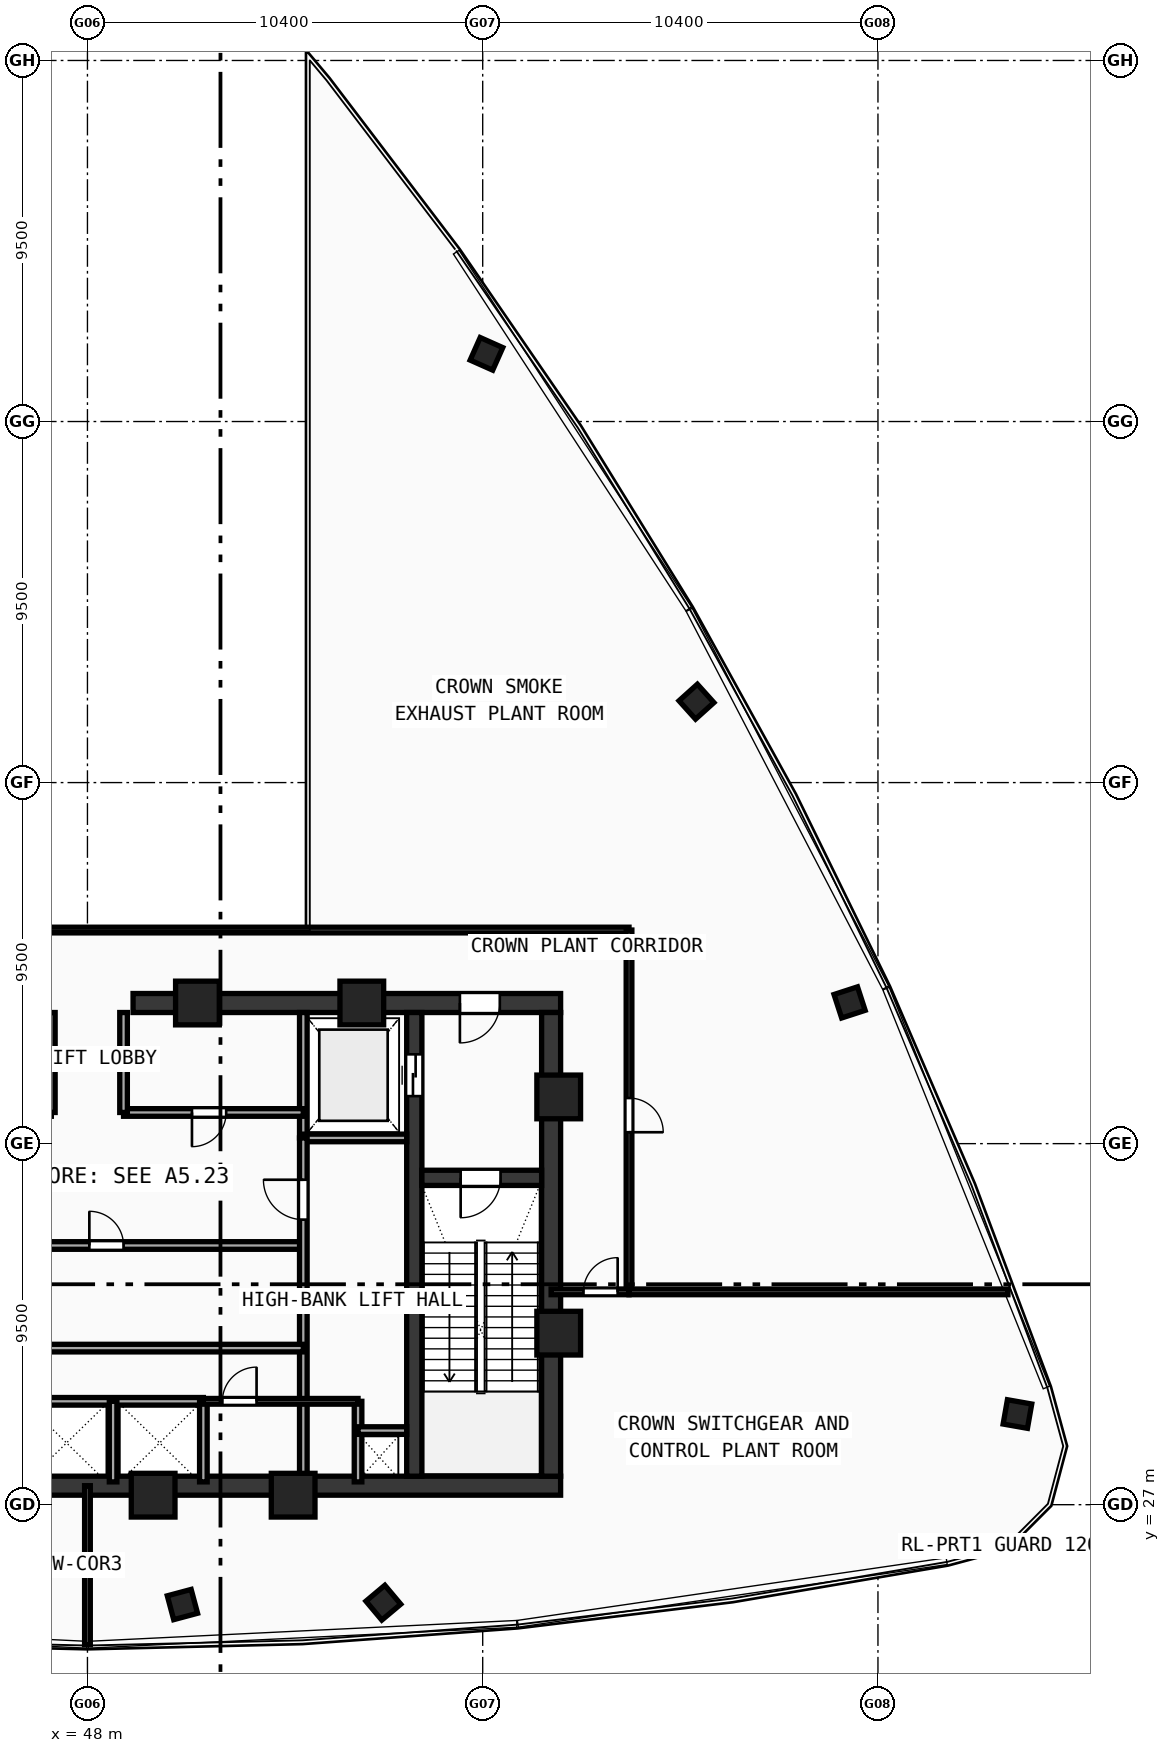
"""IFC4 building model, lengths in metres.
Left out: names, types, materials, properties, quantities, classifications, styles, units other than length and angle.
Written with IfcOpenShell. Run it as: python <this file> out.ifc"""

import sys

from ifc_helpers import new_model, si_unit, direction, frame, frame_2d, origin, origin_with_axes, origin_2d, place, context, subcontext, project, spatial, rectangle, hollow_rectangle, extrude, source, transform, mapped, element, fill, save


model = new_model("IFC4")
c1 = context("Model", 3, precision=1e-05, world=origin(), true_north=direction((0.0, 1.0)))
c2 = subcontext(c1, "Body", "Model", "MODEL_VIEW")
j1 = project(units=[si_unit("LENGTHUNIT", "METRE"), si_unit("PLANEANGLEUNIT", "RADIAN")], contexts=[c1])
p1 = place(None, origin())
s1 = spatial("IfcSite", under=j1, at=p1, CompositionType="ELEMENT")
p2 = place(p1, origin())
s2 = spatial("IfcBuilding", under=s1, at=p2, CompositionType="ELEMENT")
p3 = place(p2, frame((0.0, 0.0, 371.76)))
s3 = spatial("IfcBuildingStorey", under=s2, at=p3, CompositionType="ELEMENT", Elevation=371.76)
p4 = place(p3, frame((35.55, 27.5, 0.0), z_axis=(0.0, 0.0, 1.0), x_axis=(1.0, 0.0, 0.0)))
e1 = element("IfcWall", 1, at=p4, inside=s3, PredefinedType="SHEAR", context=c2, shape_type="SweptSolid", body=[
    extrude(rectangle(XDim=24.9, YDim=0.5, at=frame_2d((12.45, 0.0))), origin(), (0.0, 0.0, 1.0), 4.72),
])
p5 = place(p3, frame((49.2, 40.2, 0.0), z_axis=(0.0, 0.0, 1.0), x_axis=(1.0, 0.0, 0.0)))
e2 = element("IfcWall", 2, at=p5, inside=s3, PredefinedType="SHEAR", context=c2, shape_type="SweptSolid", body=[
    extrude(rectangle(XDim=11.25, YDim=0.5, at=frame_2d((5.625, 0.0))), origin(), (0.0, 0.0, 1.0), 4.72),
])
p6 = place(p5, frame((8.6, 0.0, 0.0)))
e3 = element("IfcOpeningElement", 3, at=p6, cuts=e2, PredefinedType="OPENING", context=c2, shape_type="SweptSolid", body=[
    extrude(rectangle(XDim=1.05, YDim=2.1, at=frame_2d((0.525, 1.05))), frame((0.0, 0.26, 0.0), z_axis=(0.0, -1.0, 0.0), x_axis=(1.0, 0.0, 0.0)), (0.0, 0.0, 1.0), 0.52),
])
p7 = place(p3, frame((60.2, 27.75, 0.0), z_axis=(0.0, 0.0, 1.0), x_axis=(0.0, 1.0, 0.0)))
e4 = element("IfcWall", 4, at=p7, inside=s3, PredefinedType="SHEAR", context=c2, shape_type="SweptSolid", body=[
    extrude(rectangle(XDim=12.2, YDim=0.5, at=frame_2d((6.1, 0.0))), origin(), (0.0, 0.0, 1.0), 4.72),
])
p8 = place(p3, frame((56.6, 27.75, 0.0), z_axis=(0.0, 0.0, 1.0), x_axis=(0.0, 1.0, 0.0)))
e5 = element("IfcWall", 5, at=p8, inside=s3, PredefinedType="SHEAR", context=c2, shape_type="SweptSolid", body=[
    extrude(rectangle(XDim=12.2, YDim=0.4, at=frame_2d((6.1, 0.0))), origin(), (0.0, 0.0, 1.0), 4.72),
])
p9 = place(p8, frame((10.0, 0.0, 0.0)))
e6 = element("IfcOpeningElement", 6, at=p9, cuts=e5, PredefinedType="OPENING", context=c2, shape_type="SweptSolid", body=[
    extrude(rectangle(XDim=1.1, YDim=2.1, at=frame_2d((0.55, 1.05))), frame((0.0, 0.21, 0.0), z_axis=(0.0, -1.0, 0.0), x_axis=(1.0, 0.0, 0.0)), (0.0, 0.0, 1.0), 0.42),
])
p10 = place(p3, frame((56.8, 35.6, 0.0), z_axis=(0.0, 0.0, 1.0), x_axis=(1.0, 0.0, 0.0)))
e7 = element("IfcWall", 7, at=p10, inside=s3, PredefinedType="SHEAR", context=c2, shape_type="SweptSolid", body=[
    extrude(rectangle(XDim=3.15, YDim=0.4, at=frame_2d((1.575, 0.0))), origin(), (0.0, 0.0, 1.0), 4.72),
])
p11 = place(p10, frame((1.02, 0.0, 0.0)))
e8 = element("IfcOpeningElement", 8, at=p11, cuts=e7, PredefinedType="OPENING", context=c2, shape_type="SweptSolid", body=[
    extrude(rectangle(XDim=1.05, YDim=2.1, at=frame_2d((0.525, 1.05))), frame((0.0, 0.21, 0.0), z_axis=(0.0, -1.0, 0.0), x_axis=(1.0, 0.0, 0.0)), (0.0, 0.0, 1.0), 0.42),
])
m1 = source(origin(), c2, "Body", "SweptSolid", [
    extrude(hollow_rectangle(XDim=1.15, YDim=1.15, WallThickness=0.048, at=origin_2d()), origin(), (0.0, 0.0, 1.0), 5.0),
])
for number, where, z_axis, x_axis in (
    (9, (49.729, 27.25, -0.28), (0.0, 0.0, 1.0), (1.0, 0.0, 0.0)),
    (10, (53.412, 27.25, -0.28), (0.0, 0.0, 1.0), (1.0, 0.0, 0.0)),
    (11, (60.4, 31.513, -0.28), (0.0, 0.0, 1.0), (1.0, 0.0, 0.0)),
    (12, (60.4, 37.729, -0.28), (0.0, 0.0, 1.0), (1.0, 0.0, 0.0)),
    (13, (55.219, 40.2, -0.28), (0.0, 0.0, 1.0), (1.0, 0.0, 0.0)),
    (14, (50.894, 40.2, -0.28), (0.0, 0.0, 1.0), (1.0, 0.0, 0.0)),
):
    element("IfcColumn", number, at=place(p3, frame(where, z_axis=z_axis, x_axis=x_axis)), inside=s3, PredefinedType="COLUMN", context=c2, shape_type="MappedRepresentation", body=[
        mapped(m1, transform((0.0, 0.0, 0.0), scale=1.0)),
    ])
m2 = source(origin(), c2, "Body", "SweptSolid", [
    extrude(hollow_rectangle(XDim=0.65, YDim=0.65, WallThickness=0.024, at=origin_2d()), origin(), (0.0, 0.0, 1.0), 5.0),
])
for number, where, z_axis, x_axis in (
    (15, (50.499, 24.373, -0.28), (0.0, 0.0, 1.0), (0.966, 0.259, 0.0)),
    (16, (55.785, 24.422, -0.28), (0.0, 0.0, 1.0), (0.766, 0.643, 0.0)),
    (17, (72.47, 29.385, -0.28), (0.0, 0.0, 1.0), (0.174, 0.985, 0.0)),
    (18, (68.053, 40.216, -0.28), (0.0, 0.0, 1.0), (-0.309, 0.951, 0.0)),
    (19, (64.025, 48.129, -0.28), (0.0, 0.0, 1.0), (-0.669, 0.743, 0.0)),
    (20, (58.499, 57.281, -0.28), (0.0, 0.0, 1.0), (-0.914, 0.407, 0.0)),
):
    element("IfcColumn", number, at=place(p3, frame(where, z_axis=z_axis, x_axis=x_axis)), inside=s3, PredefinedType="COLUMN", context=c2, shape_type="MappedRepresentation", body=[
        mapped(m2, transform((0.0, 0.0, 0.0), scale=1.0)),
    ])
p12 = place(p3, frame((53.68, 36.65, 0.0), z_axis=(0.0, 0.0, 1.0), x_axis=(0.0, 1.0, 0.0)))
e21 = element("IfcWall", 21, at=p12, inside=s3, PredefinedType="SOLIDWALL", context=c2, shape_type="SweptSolid", body=[
    extrude(rectangle(XDim=3.3, YDim=0.2, at=frame_2d((1.65, 0.0))), origin(), (0.0, 0.0, 1.0), 4.72),
])
p13 = place(p3, frame((53.68, 36.65, 0.0), z_axis=(0.0, 0.0, 1.0), x_axis=(1.0, 0.0, 0.0)))
e22 = element("IfcWall", 22, at=p13, inside=s3, PredefinedType="SOLIDWALL", context=c2, shape_type="SweptSolid", body=[
    extrude(rectangle(XDim=2.72, YDim=0.2, at=frame_2d((1.36, 0.0))), origin(), (0.0, 0.0, 1.0), 4.72),
])
p14 = place(p3, frame((48.95, 37.32, 0.0), z_axis=(0.0, 0.0, 1.0), x_axis=(1.0, 0.0, 0.0)))
e23 = element("IfcWall", 23, at=p14, inside=s3, PredefinedType="SOLIDWALL", context=c2, shape_type="SweptSolid", body=[
    extrude(rectangle(XDim=4.73, YDim=0.2, at=frame_2d((2.365, 0.0))), origin(), (0.0, 0.0, 1.0), 4.72),
])
p15 = place(p14, frame((1.8, 0.0, 0.0)))
e24 = element("IfcOpeningElement", 24, at=p15, cuts=e23, PredefinedType="OPENING", context=c2, shape_type="SweptSolid", body=[
    extrude(rectangle(XDim=0.9, YDim=2.1, at=frame_2d((0.45, 1.05))), frame((0.0, 0.11, 0.0), z_axis=(0.0, -1.0, 0.0), x_axis=(1.0, 0.0, 0.0)), (0.0, 0.0, 1.0), 0.22),
])
for number, where, z_axis, x_axis in (
    (25, (47.05, 37.32, 0.0), (0.0, 0.0, 1.0), (0.0, 1.0, 0.0)),
    (26, (48.95, 37.32, 0.0), (0.0, 0.0, 1.0), (0.0, 1.0, 0.0)),
):
    element("IfcWall", number, at=place(p3, frame(where, z_axis=z_axis, x_axis=x_axis)), inside=s3, PredefinedType="SOLIDWALL", context=c2, shape_type="SweptSolid", body=[
        extrude(rectangle(XDim=2.63, YDim=0.2, at=frame_2d((1.315, 0.0))), origin(), (0.0, 0.0, 1.0), 4.72),
    ])
p16 = place(p3, frame((43.85, 33.82, 0.0), z_axis=(0.0, 0.0, 1.0), x_axis=(1.0, 0.0, 0.0)))
e27 = element("IfcWall", 27, at=p16, inside=s3, PredefinedType="SOLIDWALL", context=c2, shape_type="SweptSolid", body=[
    extrude(rectangle(XDim=9.83, YDim=0.2, at=frame_2d((4.915, 0.0))), origin(), (0.0, 0.0, 1.0), 4.72),
])
p17 = place(p16, frame((4.2, 0.0, 0.0)))
e28 = element("IfcOpeningElement", 28, at=p17, cuts=e27, PredefinedType="OPENING", context=c2, shape_type="SweptSolid", body=[
    extrude(rectangle(XDim=0.9, YDim=2.1, at=frame_2d((0.45, 1.05))), frame((0.0, 0.11, 0.0), z_axis=(0.0, -1.0, 0.0), x_axis=(1.0, 0.0, 0.0)), (0.0, 0.0, 1.0), 0.22),
])
p18 = place(p3, frame((53.68, 27.6, 0.0), z_axis=(0.0, 0.0, 1.0), x_axis=(0.0, 1.0, 0.0)))
e29 = element("IfcWall", 29, at=p18, inside=s3, PredefinedType="SOLIDWALL", context=c2, shape_type="SweptSolid", body=[
    extrude(rectangle(XDim=9.05, YDim=0.2, at=frame_2d((4.525, 0.0))), origin(), (0.0, 0.0, 1.0), 4.72),
])
p19 = place(p18, frame((6.9, 0.0, 0.0)))
e30 = element("IfcOpeningElement", 30, at=p19, cuts=e29, PredefinedType="OPENING", context=c2, shape_type="SweptSolid", body=[
    extrude(rectangle(XDim=1.05, YDim=2.1, at=frame_2d((0.525, 1.05))), frame((0.0, 0.11, 0.0), z_axis=(0.0, -1.0, 0.0), x_axis=(1.0, 0.0, 0.0)), (0.0, 0.0, 1.0), 0.22),
])
p20 = place(p3, frame((43.85, 29.72, 0.0), z_axis=(0.0, 0.0, 1.0), x_axis=(1.0, 0.0, 0.0)))
e31 = element("IfcWall", 31, at=p20, inside=s3, PredefinedType="SOLIDWALL", context=c2, shape_type="SweptSolid", body=[
    extrude(rectangle(XDim=7.2, YDim=0.2, at=frame_2d((3.6, 0.0))), origin(), (0.0, 0.0, 1.0), 4.72),
])
p21 = place(p3, frame((51.05, 27.6, 0.0), z_axis=(0.0, 0.0, 1.0), x_axis=(0.0, 1.0, 0.0)))
e32 = element("IfcWall", 32, at=p21, inside=s3, PredefinedType="SOLIDWALL", context=c2, shape_type="SweptSolid", body=[
    extrude(rectangle(XDim=2.12, YDim=0.2, at=frame_2d((1.06, 0.0))), origin(), (0.0, 0.0, 1.0), 4.72),
])
p22 = place(p3, frame((43.85, 31.12, 0.0), z_axis=(0.0, 0.0, 1.0), x_axis=(1.0, 0.0, 0.0)))
e33 = element("IfcWall", 33, at=p22, inside=s3, PredefinedType="SOLIDWALL", context=c2, shape_type="SweptSolid", body=[
    extrude(rectangle(XDim=9.83, YDim=0.2, at=frame_2d((4.915, 0.0))), origin(), (0.0, 0.0, 1.0), 4.72),
])
for number, where, z_axis, x_axis in (
    (34, (48.675, 27.6, 0.0), (0.0, 0.0, 1.0), (0.0, 1.0, 0.0)),
    (35, (55.12, 27.6, 0.0), (0.0, 0.0, 1.0), (0.0, 1.0, 0.0)),
):
    element("IfcWall", number, at=place(p3, frame(where, z_axis=z_axis, x_axis=x_axis)), inside=s3, PredefinedType="SOLIDWALL", context=c2, shape_type="SweptSolid", body=[
        extrude(rectangle(XDim=2.12, YDim=0.2, at=frame_2d((1.06, 0.0))), origin(), (0.0, 0.0, 1.0), 4.72),
    ])
p23 = place(p3, frame((55.12, 28.95, 0.0), z_axis=(0.0, 0.0, 1.0), x_axis=(1.0, 0.0, 0.0)))
e36 = element("IfcWall", 36, at=p23, inside=s3, PredefinedType="SOLIDWALL", context=c2, shape_type="SweptSolid", body=[
    extrude(rectangle(XDim=1.28, YDim=0.2, at=frame_2d((0.64, 0.0))), origin(), (0.0, 0.0, 1.0), 4.72),
])
p24 = place(p3, frame((51.05, 29.72, 0.0), z_axis=(0.0, 0.0, 1.0), x_axis=(1.0, 0.0, 0.0)))
e37 = element("IfcWall", 37, at=p24, inside=s3, PredefinedType="PARTITIONING", context=c2, shape_type="SweptSolid", body=[
    extrude(rectangle(XDim=4.07, YDim=0.15, at=frame_2d((2.035, 0.0))), origin(), (0.0, 0.0, 1.0), 4.72),
])
p25 = place(p24, frame((0.5, 0.0, 0.0)))
e38 = element("IfcOpeningElement", 38, at=p25, cuts=e37, PredefinedType="OPENING", context=c2, shape_type="SweptSolid", body=[
    extrude(rectangle(XDim=0.9, YDim=2.1, at=frame_2d((0.45, 1.05))), frame((0.0, 0.085, 0.0), z_axis=(0.0, -1.0, 0.0), x_axis=(1.0, 0.0, 0.0)), (0.0, 0.0, 1.0), 0.17),
])
p26 = place(p3, frame((48.0, 23.314, 0.0), z_axis=(0.0, 0.0, 1.0), x_axis=(0.0, 1.0, 0.0)))
e39 = element("IfcWall", 39, at=p26, inside=s3, PredefinedType="PARTITIONING", context=c2, shape_type="SweptSolid", body=[
    extrude(rectangle(XDim=4.186, YDim=0.15, at=frame_2d((2.093, 0.0))), origin(), (0.0, 0.0, 1.0), 4.12),
])
p27 = place(p3, frame((35.6, 42.12, 0.0), z_axis=(0.0, 0.0, 1.0), x_axis=(1.0, 0.0, 0.0)))
e40 = element("IfcWall", 40, at=p27, inside=s3, PredefinedType="PARTITIONING", context=c2, shape_type="SweptSolid", body=[
    extrude(rectangle(XDim=26.65, YDim=0.15, at=frame_2d((13.325, 0.0))), origin(), (0.0, 0.0, 1.0), 4.12),
])
p28 = place(p3, frame((62.25, 32.6, 0.0), z_axis=(0.0, 0.0, 1.0), x_axis=(0.0, 1.0, 0.0)))
e41 = element("IfcWall", 41, at=p28, inside=s3, PredefinedType="PARTITIONING", context=c2, shape_type="SweptSolid", body=[
    extrude(rectangle(XDim=9.52, YDim=0.15, at=frame_2d((4.76, 0.0))), origin(), (0.0, 0.0, 1.0), 4.12),
])
p29 = place(p28, frame((4.2, 0.0, 0.0)))
e42 = element("IfcOpeningElement", 42, at=p29, cuts=e41, PredefinedType="OPENING", context=c2, shape_type="SweptSolid", body=[
    extrude(rectangle(XDim=0.9, YDim=2.1, at=frame_2d((0.45, 1.05))), frame((0.0, 0.085, 0.0), z_axis=(0.0, -1.0, 0.0), x_axis=(1.0, 0.0, 0.0)), (0.0, 0.0, 1.0), 0.17),
])
p30 = place(p3, frame((60.2, 32.6, 0.0), z_axis=(0.0, 0.0, 1.0), x_axis=(1.0, 0.0, 0.0)))
e43 = element("IfcWall", 43, at=p30, inside=s3, PredefinedType="PARTITIONING", context=c2, shape_type="SweptSolid", body=[
    extrude(rectangle(XDim=2.05, YDim=0.15, at=frame_2d((1.025, 0.0))), origin(), (0.0, 0.0, 1.0), 4.72),
])
p31 = place(p30, frame((0.851, 0.0, 0.0)))
e44 = element("IfcOpeningElement", 44, at=p31, cuts=e43, PredefinedType="OPENING", context=c2, shape_type="SweptSolid", body=[
    extrude(rectangle(XDim=0.9, YDim=2.1, at=frame_2d((0.45, 1.05))), frame((0.0, 0.085, 0.0), z_axis=(0.0, -1.0, 0.0), x_axis=(1.0, 0.0, 0.0)), (0.0, 0.0, 1.0), 0.17),
])
p32 = place(p3, frame((62.25, 32.6, 0.0), z_axis=(0.0, 0.0, 1.0), x_axis=(1.0, 0.0, 0.0)))
e45 = element("IfcWall", 45, at=p32, inside=s3, PredefinedType="PARTITIONING", context=c2, shape_type="SweptSolid", body=[
    extrude(rectangle(XDim=9.97, YDim=0.15, at=frame_2d((4.985, 0.0))), origin(), (0.0, 0.0, 1.0), 4.12),
])
m3 = source(origin(), c2, "Body", "SweptSolid", [
    extrude(rectangle(XDim=1.05, YDim=2.1, at=frame_2d((0.525, 1.05))), frame((0.0, 0.025, 0.0), z_axis=(0.0, -1.0, 0.0), x_axis=(1.0, 0.0, 0.0)), (0.0, 0.0, 1.0), 0.05),
])
p33 = place(p11, frame((1.05, 0.0, 0.0), z_axis=(0.0, 0.0, 1.0), x_axis=(-1.0, 0.0, 0.0)))
e46 = element("IfcDoor", 46, at=p33, inside=s3, OperationType="SINGLE_SWING_RIGHT", PredefinedType="DOOR", context=c2, shape_type="MappedRepresentation", body=[
    mapped(m3, transform((0.0, 0.0, 0.0), scale=1.0)),
])
fill(e8, e46)
p34 = place(p6, frame((1.05, 0.0, 0.0), z_axis=(0.0, 0.0, 1.0), x_axis=(-1.0, 0.0, 0.0)))
e47 = element("IfcDoor", 47, at=p34, inside=s3, OperationType="SINGLE_SWING_RIGHT", PredefinedType="DOOR", context=c2, shape_type="MappedRepresentation", body=[
    mapped(m3, transform((0.0, 0.0, 0.0), scale=1.0)),
])
fill(e3, e47)
m4 = source(origin(), c2, "Body", "SweptSolid", [
    extrude(rectangle(XDim=1.1, YDim=2.1, at=frame_2d((0.55, 1.05))), frame((0.0, 0.025, 0.0), z_axis=(0.0, -1.0, 0.0), x_axis=(1.0, 0.0, 0.0)), (0.0, 0.0, 1.0), 0.05),
])
p35 = place(p9, origin_with_axes())
e48 = element("IfcDoor", 48, at=p35, inside=s3, OperationType="DOUBLE_DOOR_SLIDING", PredefinedType="DOOR", context=c2, shape_type="MappedRepresentation", body=[
    mapped(m4, transform((0.0, 0.0, 0.0), scale=1.0)),
])
fill(e6, e48)
m5 = source(origin(), c2, "Body", "SweptSolid", [
    extrude(rectangle(XDim=0.9, YDim=2.1, at=frame_2d((0.45, 1.05))), frame((0.0, 0.025, 0.0), z_axis=(0.0, -1.0, 0.0), x_axis=(1.0, 0.0, 0.0)), (0.0, 0.0, 1.0), 0.05),
])
p36 = place(p15, frame((0.9, 0.0, 0.0), z_axis=(0.0, 0.0, 1.0), x_axis=(-1.0, 0.0, 0.0)))
e49 = element("IfcDoor", 49, at=p36, inside=s3, OperationType="SINGLE_SWING_RIGHT", PredefinedType="DOOR", context=c2, shape_type="MappedRepresentation", body=[
    mapped(m5, transform((0.0, 0.0, 0.0), scale=1.0)),
])
fill(e24, e49)
p37 = place(p17, origin_with_axes())
e50 = element("IfcDoor", 50, at=p37, inside=s3, OperationType="SINGLE_SWING_LEFT", PredefinedType="DOOR", context=c2, shape_type="MappedRepresentation", body=[
    mapped(m5, transform((0.0, 0.0, 0.0), scale=1.0)),
])
fill(e28, e50)
p38 = place(p19, origin_with_axes())
e51 = element("IfcDoor", 51, at=p38, inside=s3, OperationType="SINGLE_SWING_RIGHT", PredefinedType="DOOR", context=c2, shape_type="MappedRepresentation", body=[
    mapped(m3, transform((0.0, 0.0, 0.0), scale=1.0)),
])
fill(e30, e51)
p39 = place(p25, origin_with_axes())
e52 = element("IfcDoor", 52, at=p39, inside=s3, OperationType="SINGLE_SWING_RIGHT", PredefinedType="DOOR", context=c2, shape_type="MappedRepresentation", body=[
    mapped(m5, transform((0.0, 0.0, 0.0), scale=1.0)),
])
fill(e38, e52)
p40 = place(p29, frame((0.9, 0.0, 0.0), z_axis=(0.0, 0.0, 1.0), x_axis=(-1.0, 0.0, 0.0)))
e53 = element("IfcDoor", 53, at=p40, inside=s3, OperationType="SINGLE_SWING_RIGHT", PredefinedType="DOOR", context=c2, shape_type="MappedRepresentation", body=[
    mapped(m5, transform((0.0, 0.0, 0.0), scale=1.0)),
])
fill(e42, e53)
p41 = place(p31, origin_with_axes())
e54 = element("IfcDoor", 54, at=p41, inside=s3, OperationType="SINGLE_SWING_RIGHT", PredefinedType="DOOR", context=c2, shape_type="MappedRepresentation", body=[
    mapped(m5, transform((0.0, 0.0, 0.0), scale=1.0)),
])
fill(e44, e54)
save(model, sys.argv[1])
